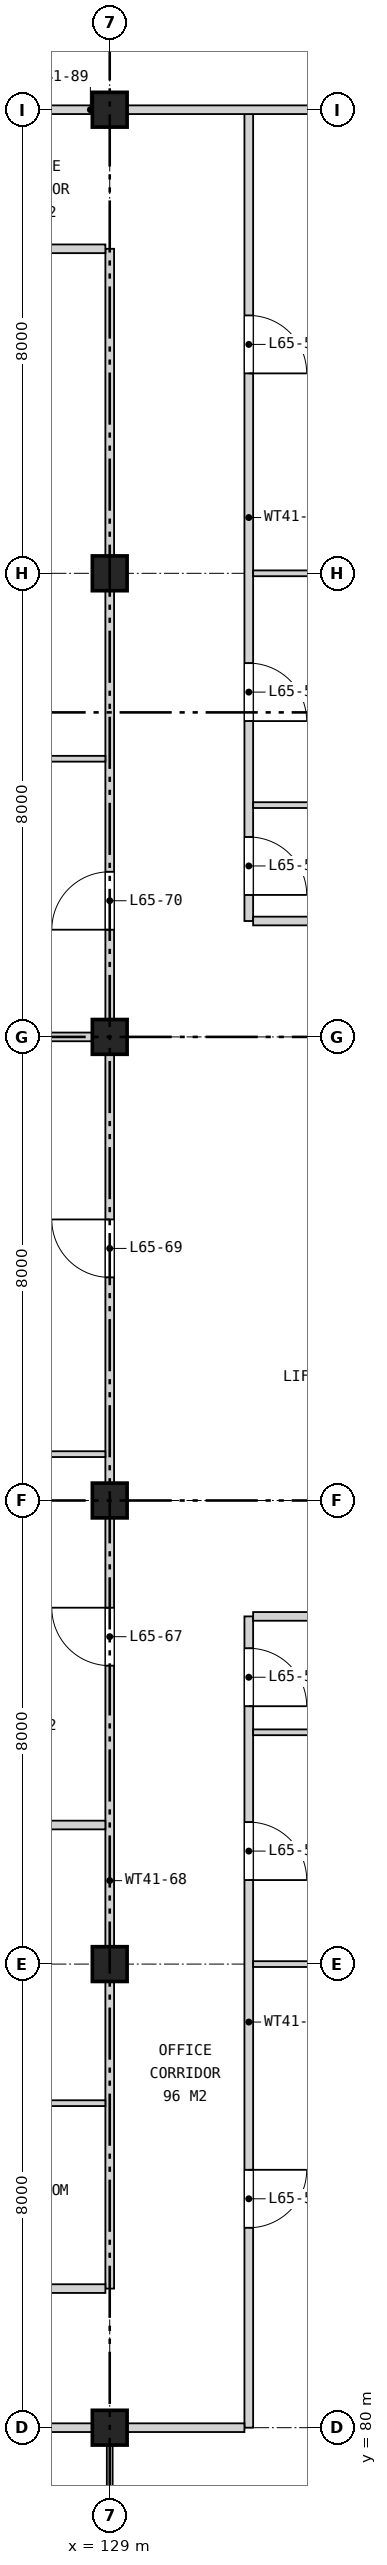
"""IFC4 building model, lengths in metres.
Left out: names, types, materials, properties, quantities, classifications, styles, units other than length and angle.
Written with IfcOpenShell. Run it as: python <this file> out.ifc"""

import sys

from ifc_helpers import new_model, si_unit, direction, frame, frame_2d, origin, origin_2d, place, context, subcontext, project, spatial, rectangle, extrude, element, fill, save


model = new_model("IFC4")
c1 = context("Model", 3, precision=1e-05, world=origin(), true_north=direction((0.0, 1.0)))
c2 = subcontext(c1, "Body", "Model", "MODEL_VIEW")
j1 = project(units=[si_unit("LENGTHUNIT", "METRE"), si_unit("PLANEANGLEUNIT", "RADIAN")], contexts=[c1])
p1 = place(None, origin())
s1 = spatial("IfcSite", under=j1, at=p1, CompositionType="ELEMENT")
p2 = place(p1, origin())
s2 = spatial("IfcBuilding", under=s1, at=p2, CompositionType="ELEMENT")
p3 = place(p2, frame((0.0, 0.0, 299.7)))
s3 = spatial("IfcBuildingStorey", under=s2, at=p3, CompositionType="ELEMENT", Elevation=299.7)
for number, where, z_axis, x_axis in (
    (1, (129.0, 80.0, 0.0), (0.0, 0.0, 1.0), (1.0, 0.0, 0.0)),
    (2, (129.0, 88.0, 0.0), (0.0, 0.0, 1.0), (1.0, 0.0, 0.0)),
    (3, (129.0, 96.0, 0.0), (0.0, 0.0, 1.0), (1.0, 0.0, 0.0)),
    (4, (129.0, 104.0, 0.0), (0.0, 0.0, 1.0), (1.0, 0.0, 0.0)),
    (5, (129.0, 112.0, 0.0), (0.0, 0.0, 1.0), (1.0, 0.0, 0.0)),
    (6, (129.0, 120.0, 0.0), (0.0, 0.0, 1.0), (1.0, 0.0, 0.0)),
):
    element("IfcColumn", number, at=place(p3, frame(where, z_axis=z_axis, x_axis=x_axis)), inside=s3, PredefinedType="COLUMN", context=c2, shape_type="SweptSolid", body=[
        extrude(rectangle(XDim=0.6, YDim=0.6, at=origin_2d()), origin(), (0.0, 0.0, 1.0), 4.2),
    ])
p4 = place(p3, frame((129.0, 71.78, 0.0), z_axis=(0.0, 0.0, 1.0), x_axis=(0.0, 1.0, 0.0)))
e7 = element("IfcWall", 7, at=p4, inside=s3, PredefinedType="PARTITIONING", context=c2, shape_type="SweptSolid", body=[
    extrude(rectangle(XDim=8.145, YDim=0.1, at=frame_2d((4.073, 0.0))), origin(), (0.0, 0.0, 1.0), 3.255),
])
p5 = place(p3, frame((129.0, 82.4, 0.0), z_axis=(0.0, 0.0, 1.0), x_axis=(0.0, 1.0, 0.0)))
e8 = element("IfcWall", 8, at=p5, inside=s3, PredefinedType="PARTITIONING", context=c2, shape_type="SweptSolid", body=[
    extrude(rectangle(XDim=35.2, YDim=0.15, at=frame_2d((17.6, 0.0))), origin(), (0.0, 0.0, 1.0), 3.255),
])
p6 = place(p5, frame((10.75, 0.0, 0.0)))
e9 = element("IfcOpeningElement", 9, at=p6, cuts=e8, PredefinedType="OPENING", context=c2, shape_type="SweptSolid", body=[
    extrude(rectangle(XDim=1.0, YDim=2.1, at=frame_2d((0.5, 1.05))), frame((0.0, 0.085, 0.0), z_axis=(0.0, -1.0, 0.0), x_axis=(1.0, 0.0, 0.0)), (0.0, 0.0, 1.0), 0.17),
])
p7 = place(p5, frame((17.45, 0.0, 0.0)))
e10 = element("IfcOpeningElement", 10, at=p7, cuts=e8, PredefinedType="OPENING", context=c2, shape_type="SweptSolid", body=[
    extrude(rectangle(XDim=1.0, YDim=2.1, at=frame_2d((0.5, 1.05))), frame((0.0, 0.085, 0.0), z_axis=(0.0, -1.0, 0.0), x_axis=(1.0, 0.0, 0.0)), (0.0, 0.0, 1.0), 0.17),
])
p8 = place(p5, frame((23.45, 0.0, 0.0)))
e11 = element("IfcOpeningElement", 11, at=p8, cuts=e8, PredefinedType="OPENING", context=c2, shape_type="SweptSolid", body=[
    extrude(rectangle(XDim=1.0, YDim=2.1, at=frame_2d((0.5, 1.05))), frame((0.0, 0.085, 0.0), z_axis=(0.0, -1.0, 0.0), x_axis=(1.0, 0.0, 0.0)), (0.0, 0.0, 1.0), 0.17),
])
p9 = place(p3, frame((131.4, 80.0, 0.0), z_axis=(0.0, 0.0, 1.0), x_axis=(0.0, 1.0, 0.0)))
e12 = element("IfcWall", 12, at=p9, inside=s3, PredefinedType="PARTITIONING", context=c2, shape_type="SweptSolid", body=[
    extrude(rectangle(XDim=14.0, YDim=0.15, at=frame_2d((7.0, 0.0))), origin(), (0.0, 0.0, 1.0), 3.255),
])
p10 = place(p9, frame((12.45, 0.0, 0.0)))
e13 = element("IfcOpeningElement", 13, at=p10, cuts=e12, PredefinedType="OPENING", context=c2, shape_type="SweptSolid", body=[
    extrude(rectangle(XDim=1.0, YDim=2.1, at=frame_2d((0.5, 1.05))), frame((0.0, 0.085, 0.0), z_axis=(0.0, -1.0, 0.0), x_axis=(1.0, 0.0, 0.0)), (0.0, 0.0, 1.0), 0.17),
])
p11 = place(p9, frame((9.45, 0.0, 0.0)))
e14 = element("IfcOpeningElement", 14, at=p11, cuts=e12, PredefinedType="OPENING", context=c2, shape_type="SweptSolid", body=[
    extrude(rectangle(XDim=1.0, YDim=2.1, at=frame_2d((0.5, 1.05))), frame((0.0, 0.085, 0.0), z_axis=(0.0, -1.0, 0.0), x_axis=(1.0, 0.0, 0.0)), (0.0, 0.0, 1.0), 0.17),
])
p12 = place(p9, frame((3.45, 0.0, 0.0)))
e15 = element("IfcOpeningElement", 15, at=p12, cuts=e12, PredefinedType="OPENING", context=c2, shape_type="SweptSolid", body=[
    extrude(rectangle(XDim=1.0, YDim=2.1, at=frame_2d((0.5, 1.05))), frame((0.0, 0.085, 0.0), z_axis=(0.0, -1.0, 0.0), x_axis=(1.0, 0.0, 0.0)), (0.0, 0.0, 1.0), 0.17),
])
p13 = place(p3, frame((131.4, 106.0, 0.0), z_axis=(0.0, 0.0, 1.0), x_axis=(0.0, 1.0, 0.0)))
e16 = element("IfcWall", 16, at=p13, inside=s3, PredefinedType="PARTITIONING", context=c2, shape_type="SweptSolid", body=[
    extrude(rectangle(XDim=13.925, YDim=0.15, at=frame_2d((6.962, 0.0))), origin(), (0.0, 0.0, 1.0), 3.255),
])
p14 = place(p13, frame((0.45, 0.0, 0.0)))
e17 = element("IfcOpeningElement", 17, at=p14, cuts=e16, PredefinedType="OPENING", context=c2, shape_type="SweptSolid", body=[
    extrude(rectangle(XDim=1.0, YDim=2.1, at=frame_2d((0.5, 1.05))), frame((0.0, 0.085, 0.0), z_axis=(0.0, -1.0, 0.0), x_axis=(1.0, 0.0, 0.0)), (0.0, 0.0, 1.0), 0.17),
])
p15 = place(p13, frame((3.45, 0.0, 0.0)))
e18 = element("IfcOpeningElement", 18, at=p15, cuts=e16, PredefinedType="OPENING", context=c2, shape_type="SweptSolid", body=[
    extrude(rectangle(XDim=1.0, YDim=2.1, at=frame_2d((0.5, 1.05))), frame((0.0, 0.085, 0.0), z_axis=(0.0, -1.0, 0.0), x_axis=(1.0, 0.0, 0.0)), (0.0, 0.0, 1.0), 0.17),
])
p16 = place(p13, frame((9.45, 0.0, 0.0)))
e19 = element("IfcOpeningElement", 19, at=p16, cuts=e16, PredefinedType="OPENING", context=c2, shape_type="SweptSolid", body=[
    extrude(rectangle(XDim=1.0, YDim=2.1, at=frame_2d((0.5, 1.05))), frame((0.0, 0.085, 0.0), z_axis=(0.0, -1.0, 0.0), x_axis=(1.0, 0.0, 0.0)), (0.0, 0.0, 1.0), 0.17),
])
p17 = place(p3, frame((118.7, 80.0, 0.0), z_axis=(0.0, 0.0, 1.0), x_axis=(1.0, 0.0, 0.0)))
e20 = element("IfcWall", 20, at=p17, inside=s3, PredefinedType="PARTITIONING", context=c2, shape_type="SweptSolid", body=[
    extrude(rectangle(XDim=12.625, YDim=0.15, at=frame_2d((6.312, 0.0))), origin(), (0.0, 0.0, 1.0), 3.255),
])
p18 = place(p17, frame((5.85, 0.0, 0.0)))
e21 = element("IfcOpeningElement", 21, at=p18, cuts=e20, PredefinedType="OPENING", context=c2, shape_type="SweptSolid", body=[
    extrude(rectangle(XDim=1.0, YDim=2.1, at=frame_2d((0.5, 1.05))), frame((0.0, 0.085, 0.0), z_axis=(0.0, -1.0, 0.0), x_axis=(1.0, 0.0, 0.0)), (0.0, 0.0, 1.0), 0.17),
])
p19 = place(p3, frame((121.075, 82.4, 0.0), z_axis=(0.0, 0.0, 1.0), x_axis=(1.0, 0.0, 0.0)))
e22 = element("IfcWall", 22, at=p19, inside=s3, PredefinedType="PARTITIONING", context=c2, shape_type="SweptSolid", body=[
    extrude(rectangle(XDim=7.85, YDim=0.15, at=frame_2d((3.925, 0.0))), origin(), (0.0, 0.0, 1.0), 3.255),
])
p20 = place(p19, frame((3.45, 0.0, 0.0)))
e23 = element("IfcOpeningElement", 23, at=p20, cuts=e22, PredefinedType="OPENING", context=c2, shape_type="SweptSolid", body=[
    extrude(rectangle(XDim=1.0, YDim=2.1, at=frame_2d((0.5, 1.05))), frame((0.0, 0.085, 0.0), z_axis=(0.0, -1.0, 0.0), x_axis=(1.0, 0.0, 0.0)), (0.0, 0.0, 1.0), 0.17),
])
p21 = place(p3, frame((121.075, 85.6, 0.0), z_axis=(0.0, 0.0, 1.0), x_axis=(1.0, 0.0, 0.0)))
e24 = element("IfcWall", 24, at=p21, inside=s3, PredefinedType="PARTITIONING", context=c2, shape_type="SweptSolid", body=[
    extrude(rectangle(XDim=7.85, YDim=0.1, at=frame_2d((3.925, 0.0))), origin(), (0.0, 0.0, 1.0), 3.255),
])
p22 = place(p3, frame((131.475, 88.0, 0.0), z_axis=(0.0, 0.0, 1.0), x_axis=(1.0, 0.0, 0.0)))
e25 = element("IfcWall", 25, at=p22, inside=s3, PredefinedType="PARTITIONING", context=c2, shape_type="SweptSolid", body=[
    extrude(rectangle(XDim=5.525, YDim=0.1, at=frame_2d((2.762, 0.0))), origin(), (0.0, 0.0, 1.0), 3.255),
])
p23 = place(p3, frame((121.075, 90.4, 0.0), z_axis=(0.0, 0.0, 1.0), x_axis=(1.0, 0.0, 0.0)))
e26 = element("IfcWall", 26, at=p23, inside=s3, PredefinedType="PARTITIONING", context=c2, shape_type="SweptSolid", body=[
    extrude(rectangle(XDim=7.85, YDim=0.15, at=frame_2d((3.925, 0.0))), origin(), (0.0, 0.0, 1.0), 3.255),
])
p24 = place(p3, frame((131.475, 92.0, 0.0), z_axis=(0.0, 0.0, 1.0), x_axis=(1.0, 0.0, 0.0)))
e27 = element("IfcWall", 27, at=p24, inside=s3, PredefinedType="PARTITIONING", context=c2, shape_type="SweptSolid", body=[
    extrude(rectangle(XDim=5.525, YDim=0.1, at=frame_2d((2.762, 0.0))), origin(), (0.0, 0.0, 1.0), 3.255),
])
p25 = place(p3, frame((131.475, 94.0, 0.0), z_axis=(0.0, 0.0, 1.0), x_axis=(1.0, 0.0, 0.0)))
e28 = element("IfcWall", 28, at=p25, inside=s3, PredefinedType="PARTITIONING", context=c2, shape_type="SweptSolid", body=[
    extrude(rectangle(XDim=5.525, YDim=0.15, at=frame_2d((2.762, 0.0))), origin(), (0.0, 0.0, 1.0), 3.255),
])
p26 = place(p3, frame((121.075, 104.0, 0.0), z_axis=(0.0, 0.0, 1.0), x_axis=(1.0, 0.0, 0.0)))
e29 = element("IfcWall", 29, at=p26, inside=s3, PredefinedType="PARTITIONING", context=c2, shape_type="SweptSolid", body=[
    extrude(rectangle(XDim=7.85, YDim=0.15, at=frame_2d((3.925, 0.0))), origin(), (0.0, 0.0, 1.0), 3.255),
])
p27 = place(p3, frame((131.475, 106.0, 0.0), z_axis=(0.0, 0.0, 1.0), x_axis=(1.0, 0.0, 0.0)))
e30 = element("IfcWall", 30, at=p27, inside=s3, PredefinedType="PARTITIONING", context=c2, shape_type="SweptSolid", body=[
    extrude(rectangle(XDim=5.525, YDim=0.15, at=frame_2d((2.762, 0.0))), origin(), (0.0, 0.0, 1.0), 3.255),
])
p28 = place(p3, frame((131.475, 108.0, 0.0), z_axis=(0.0, 0.0, 1.0), x_axis=(1.0, 0.0, 0.0)))
e31 = element("IfcWall", 31, at=p28, inside=s3, PredefinedType="PARTITIONING", context=c2, shape_type="SweptSolid", body=[
    extrude(rectangle(XDim=5.525, YDim=0.1, at=frame_2d((2.762, 0.0))), origin(), (0.0, 0.0, 1.0), 3.255),
])
p29 = place(p3, frame((121.075, 108.8, 0.0), z_axis=(0.0, 0.0, 1.0), x_axis=(1.0, 0.0, 0.0)))
e32 = element("IfcWall", 32, at=p29, inside=s3, PredefinedType="PARTITIONING", context=c2, shape_type="SweptSolid", body=[
    extrude(rectangle(XDim=7.85, YDim=0.1, at=frame_2d((3.925, 0.0))), origin(), (0.0, 0.0, 1.0), 3.255),
])
p30 = place(p3, frame((131.475, 112.0, 0.0), z_axis=(0.0, 0.0, 1.0), x_axis=(1.0, 0.0, 0.0)))
e33 = element("IfcWall", 33, at=p30, inside=s3, PredefinedType="PARTITIONING", context=c2, shape_type="SweptSolid", body=[
    extrude(rectangle(XDim=5.525, YDim=0.1, at=frame_2d((2.762, 0.0))), origin(), (0.0, 0.0, 1.0), 3.255),
])
p31 = place(p3, frame((121.075, 117.6, 0.0), z_axis=(0.0, 0.0, 1.0), x_axis=(1.0, 0.0, 0.0)))
e34 = element("IfcWall", 34, at=p31, inside=s3, PredefinedType="PARTITIONING", context=c2, shape_type="SweptSolid", body=[
    extrude(rectangle(XDim=7.85, YDim=0.15, at=frame_2d((3.925, 0.0))), origin(), (0.0, 0.0, 1.0), 3.255),
])
p32 = place(p31, frame((3.45, 0.0, 0.0)))
e35 = element("IfcOpeningElement", 35, at=p32, cuts=e34, PredefinedType="OPENING", context=c2, shape_type="SweptSolid", body=[
    extrude(rectangle(XDim=1.0, YDim=2.1, at=frame_2d((0.5, 1.05))), frame((0.0, 0.085, 0.0), z_axis=(0.0, -1.0, 0.0), x_axis=(1.0, 0.0, 0.0)), (0.0, 0.0, 1.0), 0.17),
])
p33 = place(p3, frame((112.78, 120.0, 0.0), z_axis=(0.0, 0.0, 1.0), x_axis=(1.0, 0.0, 0.0)))
e36 = element("IfcWall", 36, at=p33, inside=s3, PredefinedType="PARTITIONING", context=c2, shape_type="SweptSolid", body=[
    extrude(rectangle(XDim=24.44, YDim=0.15, at=frame_2d((12.22, 0.0))), origin(), (0.0, 0.0, 1.0), 3.255),
])
p34 = place(p33, frame((6.47, 0.0, 0.0)))
e37 = element("IfcOpeningElement", 37, at=p34, cuts=e36, PredefinedType="OPENING", context=c2, shape_type="SweptSolid", body=[
    extrude(rectangle(XDim=1.0, YDim=2.1, at=frame_2d((0.5, 1.05))), frame((0.0, 0.085, 0.0), z_axis=(0.0, -1.0, 0.0), x_axis=(1.0, 0.0, 0.0)), (0.0, 0.0, 1.0), 0.17),
])
p35 = place(p33, frame((11.27, 0.0, 0.0)))
e38 = element("IfcOpeningElement", 38, at=p35, cuts=e36, PredefinedType="OPENING", context=c2, shape_type="SweptSolid", body=[
    extrude(rectangle(XDim=1.8, YDim=2.1, at=frame_2d((0.9, 1.05))), frame((0.0, 0.085, 0.0), z_axis=(0.0, -1.0, 0.0), x_axis=(1.0, 0.0, 0.0)), (0.0, 0.0, 1.0), 0.17),
])
p36 = place(p3, frame((125.075, 96.8, 0.0), z_axis=(0.0, 0.0, 1.0), x_axis=(1.0, 0.0, 0.0)))
e39 = element("IfcWall", 39, at=p36, inside=s3, PredefinedType="PARTITIONING", context=c2, shape_type="SweptSolid", body=[
    extrude(rectangle(XDim=3.85, YDim=0.1, at=frame_2d((1.925, 0.0))), origin(), (0.0, 0.0, 1.0), 3.255),
])
p37 = place(p14, frame((1.0, 0.0, 0.0), z_axis=(0.0, 0.0, 1.0), x_axis=(-1.0, 0.0, 0.0)))
e40 = element("IfcDoor", 40, at=p37, inside=s3, OperationType="SINGLE_SWING_RIGHT", PredefinedType="DOOR", context=c2, shape_type="SweptSolid", body=[
    extrude(rectangle(XDim=1.0, YDim=2.1, at=frame_2d((0.5, 1.05))), frame((0.0, 0.025, 0.0), z_axis=(0.0, -1.0, 0.0), x_axis=(1.0, 0.0, 0.0)), (0.0, 0.0, 1.0), 0.05),
])
fill(e17, e40)
p38 = place(p15, frame((1.0, 0.0, 0.0), z_axis=(0.0, 0.0, 1.0), x_axis=(-1.0, 0.0, 0.0)))
e41 = element("IfcDoor", 41, at=p38, inside=s3, OperationType="SINGLE_SWING_RIGHT", PredefinedType="DOOR", context=c2, shape_type="SweptSolid", body=[
    extrude(rectangle(XDim=1.0, YDim=2.1, at=frame_2d((0.5, 1.05))), frame((0.0, 0.025, 0.0), z_axis=(0.0, -1.0, 0.0), x_axis=(1.0, 0.0, 0.0)), (0.0, 0.0, 1.0), 0.05),
])
fill(e18, e41)
p39 = place(p16, frame((1.0, 0.0, 0.0), z_axis=(0.0, 0.0, 1.0), x_axis=(-1.0, 0.0, 0.0)))
e42 = element("IfcDoor", 42, at=p39, inside=s3, OperationType="SINGLE_SWING_RIGHT", PredefinedType="DOOR", context=c2, shape_type="SweptSolid", body=[
    extrude(rectangle(XDim=1.0, YDim=2.1, at=frame_2d((0.5, 1.05))), frame((0.0, 0.025, 0.0), z_axis=(0.0, -1.0, 0.0), x_axis=(1.0, 0.0, 0.0)), (0.0, 0.0, 1.0), 0.05),
])
fill(e19, e42)
p40 = place(p10, frame((1.0, 0.0, 0.0), z_axis=(0.0, 0.0, 1.0), x_axis=(-1.0, 0.0, 0.0)))
e43 = element("IfcDoor", 43, at=p40, inside=s3, OperationType="SINGLE_SWING_RIGHT", PredefinedType="DOOR", context=c2, shape_type="SweptSolid", body=[
    extrude(rectangle(XDim=1.0, YDim=2.1, at=frame_2d((0.5, 1.05))), frame((0.0, 0.025, 0.0), z_axis=(0.0, -1.0, 0.0), x_axis=(1.0, 0.0, 0.0)), (0.0, 0.0, 1.0), 0.05),
])
fill(e13, e43)
p41 = place(p11, frame((1.0, 0.0, 0.0), z_axis=(0.0, 0.0, 1.0), x_axis=(-1.0, 0.0, 0.0)))
e44 = element("IfcDoor", 44, at=p41, inside=s3, OperationType="SINGLE_SWING_RIGHT", PredefinedType="DOOR", context=c2, shape_type="SweptSolid", body=[
    extrude(rectangle(XDim=1.0, YDim=2.1, at=frame_2d((0.5, 1.05))), frame((0.0, 0.025, 0.0), z_axis=(0.0, -1.0, 0.0), x_axis=(1.0, 0.0, 0.0)), (0.0, 0.0, 1.0), 0.05),
])
fill(e14, e44)
p42 = place(p12, frame((1.0, 0.0, 0.0), z_axis=(0.0, 0.0, 1.0), x_axis=(-1.0, 0.0, 0.0)))
e45 = element("IfcDoor", 45, at=p42, inside=s3, OperationType="SINGLE_SWING_LEFT", PredefinedType="DOOR", context=c2, shape_type="SweptSolid", body=[
    extrude(rectangle(XDim=1.0, YDim=2.1, at=frame_2d((0.5, 1.05))), frame((0.0, 0.025, 0.0), z_axis=(0.0, -1.0, 0.0), x_axis=(1.0, 0.0, 0.0)), (0.0, 0.0, 1.0), 0.05),
])
fill(e15, e45)
p43 = place(p6, origin())
e46 = element("IfcDoor", 46, at=p43, inside=s3, OperationType="SINGLE_SWING_RIGHT", PredefinedType="DOOR", context=c2, shape_type="SweptSolid", body=[
    extrude(rectangle(XDim=1.0, YDim=2.1, at=frame_2d((0.5, 1.05))), frame((0.0, 0.025, 0.0), z_axis=(0.0, -1.0, 0.0), x_axis=(1.0, 0.0, 0.0)), (0.0, 0.0, 1.0), 0.05),
])
fill(e9, e46)
p44 = place(p7, origin())
e47 = element("IfcDoor", 47, at=p44, inside=s3, OperationType="SINGLE_SWING_RIGHT", PredefinedType="DOOR", context=c2, shape_type="SweptSolid", body=[
    extrude(rectangle(XDim=1.0, YDim=2.1, at=frame_2d((0.5, 1.05))), frame((0.0, 0.025, 0.0), z_axis=(0.0, -1.0, 0.0), x_axis=(1.0, 0.0, 0.0)), (0.0, 0.0, 1.0), 0.05),
])
fill(e10, e47)
p45 = place(p8, origin())
e48 = element("IfcDoor", 48, at=p45, inside=s3, OperationType="SINGLE_SWING_LEFT", PredefinedType="DOOR", context=c2, shape_type="SweptSolid", body=[
    extrude(rectangle(XDim=1.0, YDim=2.1, at=frame_2d((0.5, 1.05))), frame((0.0, 0.025, 0.0), z_axis=(0.0, -1.0, 0.0), x_axis=(1.0, 0.0, 0.0)), (0.0, 0.0, 1.0), 0.05),
])
fill(e11, e48)
save(model, sys.argv[1])
